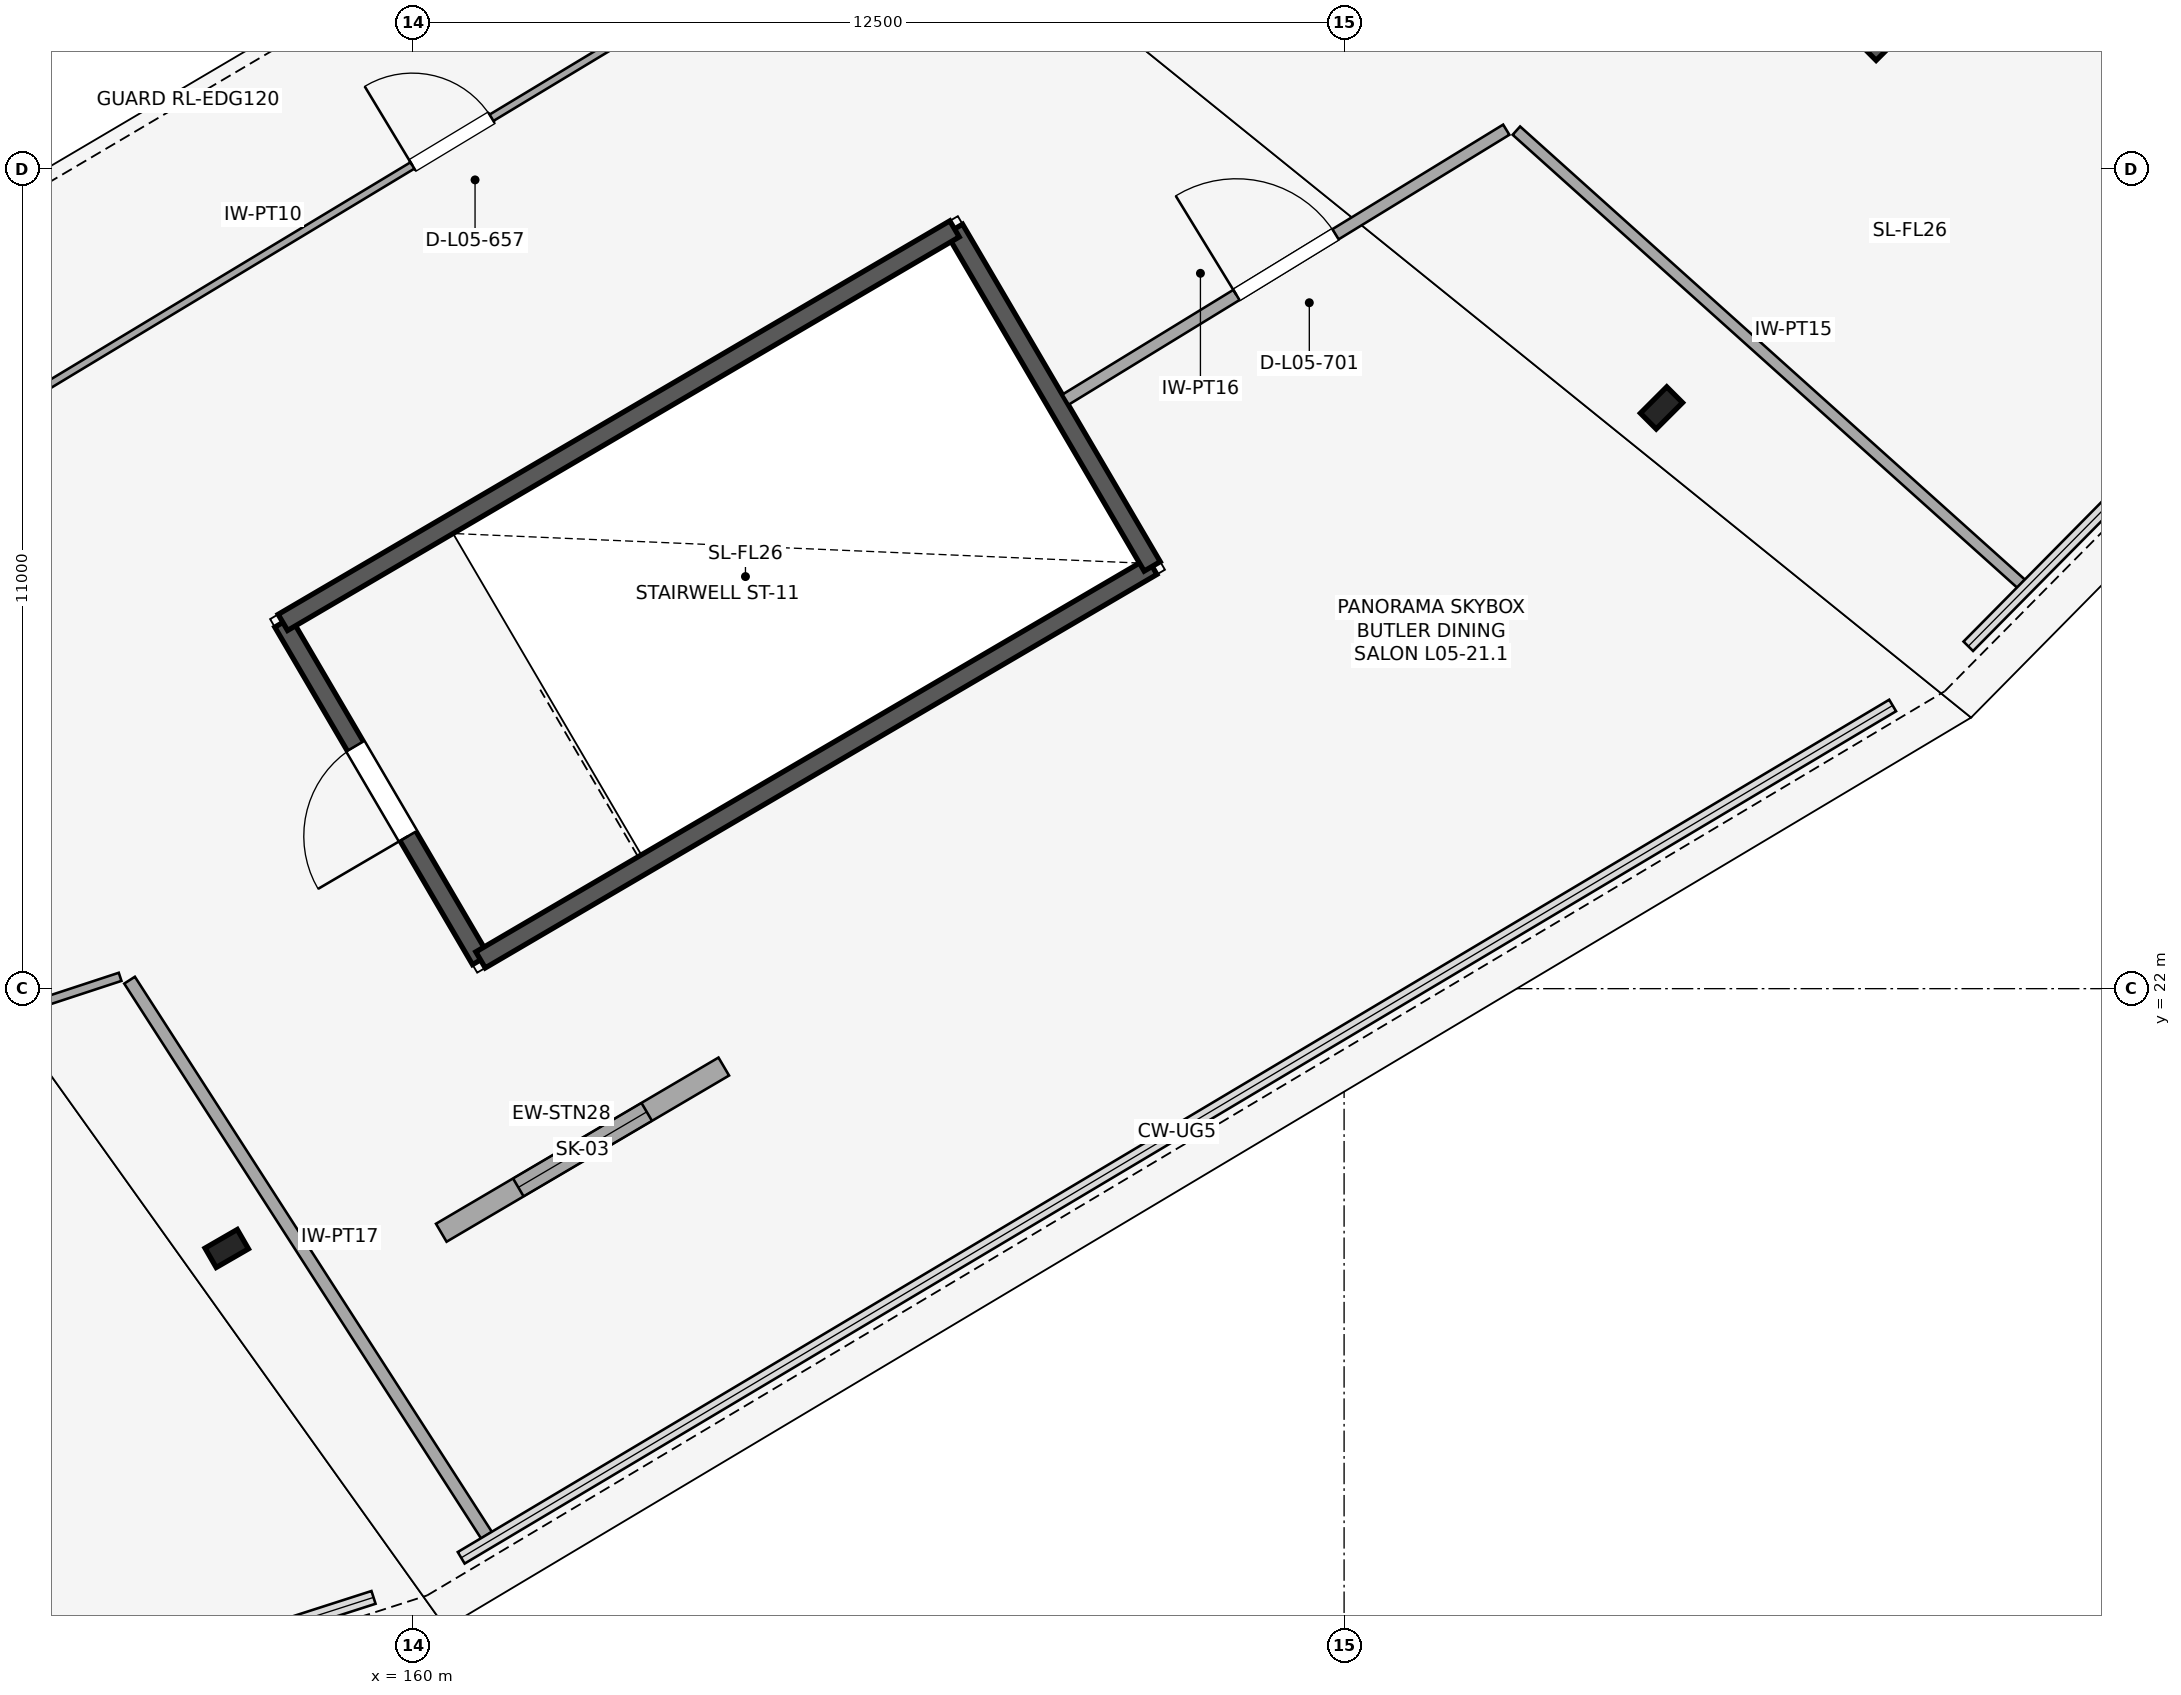
"""IFC4 building model, lengths in metres.
Left out: names, types, materials, properties, quantities, classifications, styles, units other than length and angle.
Written with IfcOpenShell. Run it as: python <this file> out.ifc"""

import sys

from ifc_helpers import new_model, si_unit, direction, frame, frame_2d, origin, origin_2d, place, context, subcontext, project, spatial, rectangle, i_section, extrude, element, fill, save


model = new_model("IFC4")
c1 = context("Model", 3, precision=1e-05, world=origin(), true_north=direction((0.0, 1.0)))
c2 = subcontext(c1, "Body", "Model", "MODEL_VIEW")
j1 = project(units=[si_unit("LENGTHUNIT", "METRE"), si_unit("PLANEANGLEUNIT", "RADIAN")], contexts=[c1])
p1 = place(None, origin())
s1 = spatial("IfcSite", under=j1, at=p1, CompositionType="ELEMENT")
p2 = place(p1, origin())
s2 = spatial("IfcBuilding", under=s1, at=p2, CompositionType="ELEMENT")
p3 = place(p2, frame((0.0, 0.0, 26.2)))
s3 = spatial("IfcBuildingStorey", under=s2, at=p3, CompositionType="ELEMENT", Elevation=26.2)
for number, where, z_axis, x_axis in (
    (1, (157.5, 18.512, 0.0), (0.0, 0.0, 1.0), (0.5, -0.866, 0.0)),
    (2, (176.761, 29.795, 0.0), (0.0, 0.0, 1.0), (0.707, -0.707, 0.0)),
):
    element("IfcColumn", number, at=place(p3, frame(where, z_axis=z_axis, x_axis=x_axis)), inside=s3, PredefinedType="COLUMN", context=c2, shape_type="SweptSolid", body=[
        extrude(i_section(OverallWidth=0.3, OverallDepth=0.5, WebThickness=0.014, FlangeThickness=0.028, FilletRadius=0.027, at=origin_2d()), origin(), (0.0, 0.0, 1.0), 5.6),
    ])
p4 = place(p3, frame((160.38, 18.724, 0.0), z_axis=(0.0, 0.0, 1.0), x_axis=(0.861939920372, 0.507010427574, 0.0)))
e3 = element("IfcWall", 3, at=p4, inside=s3, PredefinedType="STANDARD", context=c2, shape_type="SweptSolid", body=[
    extrude(rectangle(XDim=4.4, YDim=0.28, at=frame_2d((2.2, 0.0))), origin(), (0.0, 0.0, 1.0), 3.4),
])
p5 = place(p4, frame((1.2, 0.0, 0.8)))
e4 = element("IfcOpeningElement", 4, at=p5, cuts=e3, PredefinedType="OPENING", context=c2, shape_type="SweptSolid", body=[
    extrude(rectangle(XDim=2.0, YDim=1.9, at=frame_2d((1.0, 0.95))), frame((0.0, 0.15, 0.0), z_axis=(0.0, -1.0, 0.0), x_axis=(1.0, 0.0, 0.0)), (0.0, 0.0, 1.0), 0.3),
])
p6 = place(p3, frame((158.253, 26.916, 0.0), z_axis=(0.0, 0.0, 1.0), x_axis=(0.505460490551, -0.862849750821, 0.0)))
e5 = element("IfcWall", 5, at=p6, inside=s3, PredefinedType="SHEAR", context=c2, shape_type="SweptSolid", body=[
    extrude(rectangle(XDim=5.25, YDim=0.25, at=frame_2d((2.625, 0.0))), origin(), (0.0, 0.0, 1.0), 3.2),
])
p7 = place(p6, frame((1.925, 0.0, 0.0)))
e6 = element("IfcOpeningElement", 6, at=p7, cuts=e5, PredefinedType="OPENING", context=c2, shape_type="SweptSolid", body=[
    extrude(rectangle(XDim=1.4, YDim=2.2, at=frame_2d((0.7, 1.1))), frame((0.0, 0.135, 0.0), z_axis=(0.0, -1.0, 0.0), x_axis=(1.0, 0.0, 0.0)), (0.0, 0.0, 1.0), 0.27),
])
p8 = place(p3, frame((160.907, 22.386, 0.0), z_axis=(0.0, 0.0, 1.0), x_axis=(0.862854686184, 0.505452065513, 0.0)))
e7 = element("IfcWall", 7, at=p8, inside=s3, PredefinedType="SHEAR", context=c2, shape_type="SweptSolid", body=[
    extrude(rectangle(XDim=10.45, YDim=0.25, at=frame_2d((5.225, 0.0))), origin(), (0.0, 0.0, 1.0), 3.2),
])
p9 = place(p3, frame((169.924, 27.668, 0.0), z_axis=(0.0, 0.0, 1.0), x_axis=(-0.505474830399, 0.862841350327, 0.0)))
e8 = element("IfcWall", 8, at=p9, inside=s3, PredefinedType="SHEAR", context=c2, shape_type="SweptSolid", body=[
    extrude(rectangle(XDim=5.25, YDim=0.25, at=frame_2d((2.625, 0.0))), origin(), (0.0, 0.0, 1.0), 3.2),
])
p10 = place(p3, frame((167.27, 32.198, 0.0), z_axis=(0.0, 0.0, 1.0), x_axis=(-0.862838527648, -0.505479648657, 0.0)))
e9 = element("IfcWall", 9, at=p10, inside=s3, PredefinedType="SHEAR", context=c2, shape_type="SweptSolid", body=[
    extrude(rectangle(XDim=10.45, YDim=0.25, at=frame_2d((5.225, 0.0))), origin(), (0.0, 0.0, 1.0), 3.2),
])
p11 = place(p3, frame((179.547, 34.556, 0.0), z_axis=(0.0, 0.0, 1.0), x_axis=(0.708902567846, 0.705306422274, 0.0)))
e10 = element("IfcWall", 10, at=p11, inside=s3, PredefinedType="SHEAR", context=c2, shape_type="SweptSolid", body=[
    extrude(rectangle(XDim=7.4, YDim=0.27, at=frame_2d((3.7, 0.0))), origin(), (0.0, 0.0, 1.0), 3.2),
])
p12 = place(p3, frame((152.875, 28.756, 0.0), z_axis=(0.0, 0.0, 1.0), x_axis=(0.856254564886, 0.516554082465, 0.0)))
e11 = element("IfcWall", 11, at=p12, inside=s3, PredefinedType="PARTITIONING", context=c2, shape_type="SweptSolid", body=[
    extrude(rectangle(XDim=17.866, YDim=0.1, at=frame_2d((8.933, 0.0))), origin(), (0.0, 0.0, 1.0), 4.1),
])
p13 = place(p12, frame((8.313, 0.0, 0.0)))
e12 = element("IfcOpeningElement", 12, at=p13, cuts=e11, PredefinedType="OPENING", context=c2, shape_type="SweptSolid", body=[
    extrude(rectangle(XDim=1.24, YDim=2.24, at=frame_2d((0.62, 1.12))), frame((0.0, 0.06, 0.0), z_axis=(0.0, -1.0, 0.0), x_axis=(1.0, 0.0, 0.0)), (0.0, 0.0, 1.0), 0.12),
])
p14 = place(p3, frame((135.915, 15.541, 0.0), z_axis=(0.0, 0.0, 1.0), x_axis=(0.950079230019, 0.312008744568, 0.0)))
e13 = element("IfcWall", 13, at=p14, inside=s3, PredefinedType="MOVABLE", context=c2, shape_type="SweptSolid", body=[
    extrude(rectangle(XDim=21.212, YDim=0.115, at=frame_2d((10.606, 0.0))), origin(), (0.0, 0.0, 1.0), 4.1),
])
p15 = place(p14, frame((9.986, 0.0, 0.0)))
e14 = element("IfcOpeningElement", 14, at=p15, cuts=e13, PredefinedType="OPENING", context=c2, shape_type="SweptSolid", body=[
    extrude(rectangle(XDim=1.24, YDim=2.24, at=frame_2d((0.62, 1.12))), frame((0.0, 0.067, 0.0), z_axis=(0.0, -1.0, 0.0), x_axis=(1.0, 0.0, 0.0)), (0.0, 0.0, 1.0), 0.135),
])
p16 = place(p3, frame((156.195, 22.114, 0.0), z_axis=(0.0, 0.0, 1.0), x_axis=(0.540953941146, -0.841052218093, 0.0)))
e15 = element("IfcWall", 15, at=p16, inside=s3, PredefinedType="PARTITIONING", context=c2, shape_type="SweptSolid", body=[
    extrude(rectangle(XDim=8.86, YDim=0.17, at=frame_2d((4.43, 0.0))), origin(), (0.0, 0.0, 1.0), 4.1),
])
p17 = place(p3, frame((168.762, 29.908, 0.0), z_axis=(0.0, 0.0, 1.0), x_axis=(0.852817711414, 0.52220872369, 0.0)))
e16 = element("IfcWall", 16, at=p17, inside=s3, PredefinedType="PARTITIONING", context=c2, shape_type="SweptSolid", body=[
    extrude(rectangle(XDim=6.936, YDim=0.16, at=frame_2d((3.468, 0.0))), origin(), (0.0, 0.0, 1.0), 4.1),
])
p18 = place(p17, frame((2.688, 0.0, 0.0)))
e17 = element("IfcOpeningElement", 17, at=p18, cuts=e16, PredefinedType="OPENING", context=c2, shape_type="SweptSolid", body=[
    extrude(rectangle(XDim=1.56, YDim=2.38, at=frame_2d((0.78, 1.19))), frame((0.0, 0.09, 0.0), z_axis=(0.0, -1.0, 0.0), x_axis=(1.0, 0.0, 0.0)), (0.0, 0.0, 1.0), 0.18),
])
p19 = place(p3, frame((174.813, 33.518, 0.0), z_axis=(0.0, 0.0, 1.0), x_axis=(0.744190680706, -0.667967237782, 0.0)))
e18 = element("IfcWall", 18, at=p19, inside=s3, PredefinedType="PARTITIONING", context=c2, shape_type="SweptSolid", body=[
    extrude(rectangle(XDim=9.106, YDim=0.15, at=frame_2d((4.553, 0.0))), origin(), (0.0, 0.0, 1.0), 4.1),
])
p20 = place(p5, origin())
e19 = element("IfcWindow", 19, at=p20, inside=s3, PartitioningType="SINGLE_PANEL", PredefinedType="SKYLIGHT", context=c2, shape_type="SweptSolid", body=[
    extrude(rectangle(XDim=2.0, YDim=1.9, at=frame_2d((1.0, 0.95))), frame((0.0, 0.03, 0.0), z_axis=(0.0, -1.0, 0.0), x_axis=(1.0, 0.0, 0.0)), (0.0, 0.0, 1.0), 0.06),
])
fill(e4, e19)
p21 = place(p7, frame((1.4, 0.0, 0.0), z_axis=(0.0, 0.0, 1.0), x_axis=(-1.0, 0.0, 0.0)))
e20 = element("IfcDoor", 20, at=p21, inside=s3, OperationType="SINGLE_SWING_LEFT", PredefinedType="DOOR", context=c2, shape_type="SweptSolid", body=[
    extrude(rectangle(XDim=1.4, YDim=2.2, at=frame_2d((0.7, 1.1))), frame((0.0, 0.025, 0.0), z_axis=(0.0, -1.0, 0.0), x_axis=(1.0, 0.0, 0.0)), (0.0, 0.0, 1.0), 0.05),
])
fill(e6, e20)
p22 = place(p13, origin())
e21 = element("IfcDoor", 21, at=p22, inside=s3, OperationType="SINGLE_SWING_LEFT", PredefinedType="DOOR", context=c2, shape_type="SweptSolid", body=[
    extrude(rectangle(XDim=1.24, YDim=2.24, at=frame_2d((0.62, 1.12))), frame((0.0, 0.025, 0.0), z_axis=(0.0, -1.0, 0.0), x_axis=(1.0, 0.0, 0.0)), (0.0, 0.0, 1.0), 0.05),
])
fill(e12, e21)
p23 = place(p18, origin())
e22 = element("IfcDoor", 22, at=p23, inside=s3, OperationType="SINGLE_SWING_LEFT", PredefinedType="DOOR", context=c2, shape_type="SweptSolid", body=[
    extrude(rectangle(XDim=1.56, YDim=2.38, at=frame_2d((0.78, 1.19))), frame((0.0, 0.025, 0.0), z_axis=(0.0, -1.0, 0.0), x_axis=(1.0, 0.0, 0.0)), (0.0, 0.0, 1.0), 0.05),
])
fill(e17, e22)
save(model, sys.argv[1])
